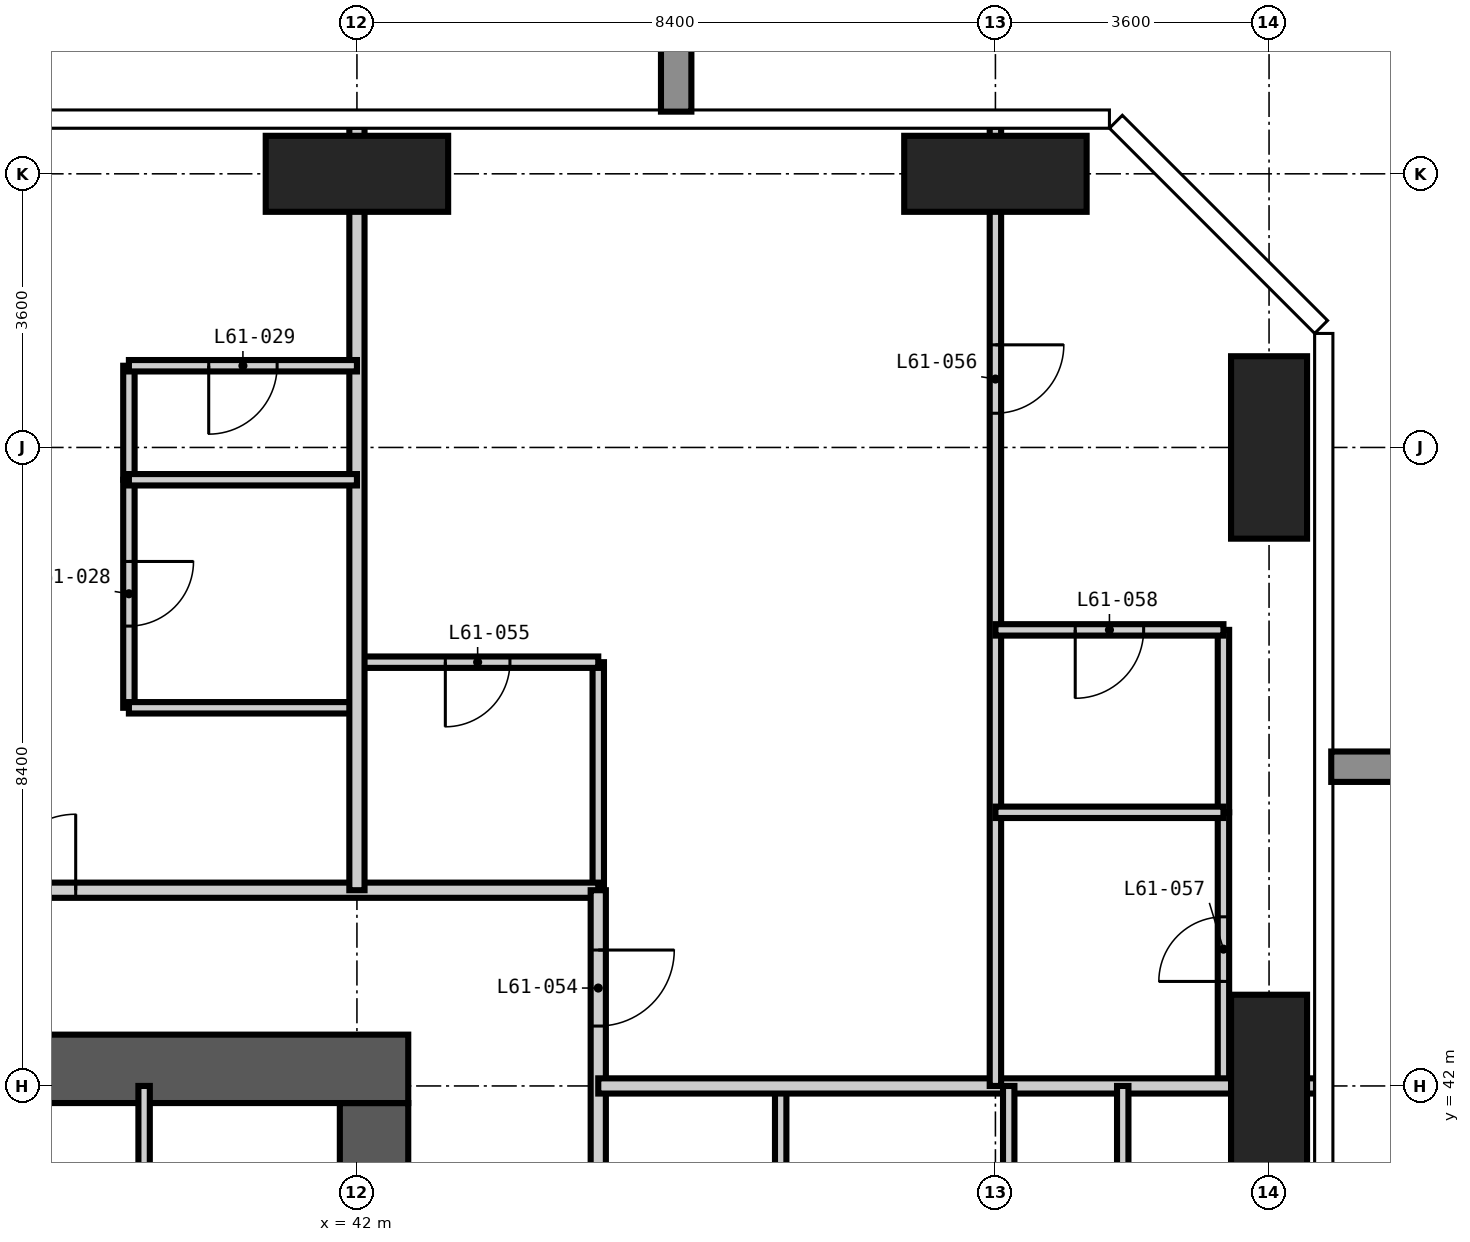
"""IFC4 building model, lengths in metres.
Left out: names, types, materials, properties, quantities, classifications, styles, units other than length and angle.
Written with IfcOpenShell. Run it as: python <this file> out.ifc"""

import sys

from ifc_helpers import new_model, si_unit, direction, frame, frame_2d, origin, origin_2d, place, context, subcontext, project, spatial, rectangle, extrude, element, fill, save


model = new_model("IFC4")
c1 = context("Model", 3, precision=1e-05, world=origin(), true_north=direction((0.0, 1.0)))
c2 = subcontext(c1, "Body", "Model", "MODEL_VIEW")
j1 = project(units=[si_unit("LENGTHUNIT", "METRE"), si_unit("PLANEANGLEUNIT", "RADIAN")], contexts=[c1])
p1 = place(None, origin())
s1 = spatial("IfcSite", under=j1, at=p1, CompositionType="ELEMENT")
p2 = place(p1, origin())
s2 = spatial("IfcBuilding", under=s1, at=p2, CompositionType="ELEMENT")
p3 = place(p2, frame((0.0, 0.0, 237.3)))
s3 = spatial("IfcBuildingStorey", under=s2, at=p3, CompositionType="ELEMENT", Elevation=237.3)
for number, where, z_axis, x_axis in (
    (1, (42.0, 54.0, -0.35), (0.0, 0.0, 1.0), (1.0, 0.0, 0.0)),
    (2, (50.4, 54.0, -0.35), (0.0, 0.0, 1.0), (1.0, 0.0, 0.0)),
):
    element("IfcColumn", number, at=place(p3, frame(where, z_axis=z_axis, x_axis=x_axis)), inside=s3, PredefinedType="COLUMN", context=c2, shape_type="SweptSolid", body=[
        extrude(rectangle(XDim=2.4, YDim=1.0, at=origin_2d()), origin(), (0.0, 0.0, 1.0), 3.9),
    ])
for number, where, z_axis, x_axis in (
    (3, (54.0, 42.0, -0.35), (0.0, 0.0, 1.0), (1.0, 0.0, 0.0)),
    (4, (54.0, 50.4, -0.35), (0.0, 0.0, 1.0), (1.0, 0.0, 0.0)),
):
    element("IfcColumn", number, at=place(p3, frame(where, z_axis=z_axis, x_axis=x_axis)), inside=s3, PredefinedType="COLUMN", context=c2, shape_type="SweptSolid", body=[
        extrude(rectangle(XDim=1.0, YDim=2.4, at=origin_2d()), origin(), (0.0, 0.0, 1.0), 3.9),
    ])
p4 = place(p3, frame((42.225, 17.025, -0.35), z_axis=(0.0, 0.0, 1.0), x_axis=(0.0, 1.0, 0.0)))
e5 = element("IfcWall", 5, at=p4, inside=s3, PredefinedType="SHEAR", context=c2, shape_type="SweptSolid", body=[
    extrude(rectangle(XDim=24.75, YDim=0.9, at=frame_2d((12.375, 0.0))), origin(), (0.0, 0.0, 1.0), 3.9),
])
p5 = place(p4, frame((0.575, 0.0, 0.35)))
e6 = element("IfcOpeningElement", 6, at=p5, cuts=e5, PredefinedType="OPENING", context=c2, shape_type="SweptSolid", body=[
    extrude(rectangle(XDim=1.2, YDim=2.2, at=frame_2d((0.6, 1.1))), frame((0.0, 0.46, 0.0), z_axis=(0.0, -1.0, 0.0), x_axis=(1.0, 0.0, 0.0)), (0.0, 0.0, 1.0), 0.92),
])
p6 = place(p4, frame((11.475, 0.0, 0.35)))
e7 = element("IfcOpeningElement", 7, at=p6, cuts=e5, PredefinedType="OPENING", context=c2, shape_type="SweptSolid", body=[
    extrude(rectangle(XDim=1.8, YDim=2.2, at=frame_2d((0.9, 1.1))), frame((0.0, 0.46, 0.0), z_axis=(0.0, -1.0, 0.0), x_axis=(1.0, 0.0, 0.0)), (0.0, 0.0, 1.0), 0.92),
])
p7 = place(p4, frame((20.275, 0.0, 0.35)))
e8 = element("IfcOpeningElement", 8, at=p7, cuts=e5, PredefinedType="OPENING", context=c2, shape_type="SweptSolid", body=[
    extrude(rectangle(XDim=1.0, YDim=2.1, at=frame_2d((0.5, 1.05))), frame((0.0, 0.46, 0.0), z_axis=(0.0, -1.0, 0.0), x_axis=(1.0, 0.0, 0.0)), (0.0, 0.0, 1.0), 0.92),
])
p8 = place(p3, frame((42.675, 42.225, -0.35), z_axis=(0.0, 0.0, 1.0), x_axis=(-1.0, 0.0, 0.0)))
e9 = element("IfcWall", 9, at=p8, inside=s3, PredefinedType="SHEAR", context=c2, shape_type="SweptSolid", body=[
    extrude(rectangle(XDim=18.15, YDim=0.9, at=frame_2d((9.075, 0.0))), origin(), (0.0, 0.0, 1.0), 3.9),
])
p9 = place(p8, frame((10.575, 0.0, 0.35)))
e10 = element("IfcOpeningElement", 10, at=p9, cuts=e9, PredefinedType="OPENING", context=c2, shape_type="SweptSolid", body=[
    extrude(rectangle(XDim=1.2, YDim=2.2, at=frame_2d((0.6, 1.1))), frame((0.0, 0.46, 0.0), z_axis=(0.0, -1.0, 0.0), x_axis=(1.0, 0.0, 0.0)), (0.0, 0.0, 1.0), 0.92),
])
p10 = place(p3, frame((39.0, 46.975, 0.0), z_axis=(0.0, 0.0, 1.0), x_axis=(0.0, 1.0, 0.0)))
e11 = element("IfcWall", 11, at=p10, inside=s3, PredefinedType="PARTITIONING", context=c2, shape_type="SweptSolid", body=[
    extrude(rectangle(XDim=3.0, YDim=0.15, at=frame_2d((1.5, 0.0))), origin(), (0.0, 0.0, 1.0), 3.55),
])
p11 = place(p10, frame((1.075, 0.0, 0.0)))
e12 = element("IfcOpeningElement", 12, at=p11, cuts=e11, PredefinedType="OPENING", context=c2, shape_type="SweptSolid", body=[
    extrude(rectangle(XDim=0.85, YDim=2.1, at=frame_2d((0.425, 1.05))), frame((0.0, 0.085, 0.0), z_axis=(0.0, -1.0, 0.0), x_axis=(1.0, 0.0, 0.0)), (0.0, 0.0, 1.0), 0.17),
])
p12 = place(p3, frame((45.175, 44.575, 0.0), z_axis=(0.0, 0.0, 1.0), x_axis=(0.0, 1.0, 0.0)))
e13 = element("IfcWall", 13, at=p12, inside=s3, PredefinedType="PARTITIONING", context=c2, shape_type="SweptSolid", body=[
    extrude(rectangle(XDim=3.0, YDim=0.15, at=frame_2d((1.5, 0.0))), origin(), (0.0, 0.0, 1.0), 3.55),
])
p13 = place(p3, frame((47.575, 39.0, 0.0), z_axis=(0.0, 0.0, 1.0), x_axis=(0.0, 1.0, 0.0)))
e14 = element("IfcWall", 14, at=p13, inside=s3, PredefinedType="PARTITIONING", context=c2, shape_type="SweptSolid", body=[
    extrude(rectangle(XDim=3.0, YDim=0.15, at=frame_2d((1.5, 0.0))), origin(), (0.0, 0.0, 1.0), 3.55),
])
p14 = place(p13, frame((1.075, 0.0, 0.0)))
e15 = element("IfcOpeningElement", 15, at=p14, cuts=e14, PredefinedType="OPENING", context=c2, shape_type="SweptSolid", body=[
    extrude(rectangle(XDim=0.85, YDim=2.1, at=frame_2d((0.425, 1.05))), frame((0.0, 0.085, 0.0), z_axis=(0.0, -1.0, 0.0), x_axis=(1.0, 0.0, 0.0)), (0.0, 0.0, 1.0), 0.17),
])
p15 = place(p3, frame((53.4, 42.0, 0.0), z_axis=(0.0, 0.0, 1.0), x_axis=(0.0, 1.0, 0.0)))
e16 = element("IfcWall", 16, at=p15, inside=s3, PredefinedType="PARTITIONING", context=c2, shape_type="SweptSolid", body=[
    extrude(rectangle(XDim=3.6, YDim=0.15, at=frame_2d((1.8, 0.0))), origin(), (0.0, 0.0, 1.0), 3.55),
])
p16 = place(p15, frame((1.375, 0.0, 0.0)))
e17 = element("IfcOpeningElement", 17, at=p16, cuts=e16, PredefinedType="OPENING", context=c2, shape_type="SweptSolid", body=[
    extrude(rectangle(XDim=0.85, YDim=2.1, at=frame_2d((0.425, 1.05))), frame((0.0, 0.085, 0.0), z_axis=(0.0, -1.0, 0.0), x_axis=(1.0, 0.0, 0.0)), (0.0, 0.0, 1.0), 0.17),
])
p17 = place(p3, frame((39.0, 46.975, 0.0), z_axis=(0.0, 0.0, 1.0), x_axis=(1.0, 0.0, 0.0)))
e18 = element("IfcWall", 18, at=p17, inside=s3, PredefinedType="PARTITIONING", context=c2, shape_type="SweptSolid", body=[
    extrude(rectangle(XDim=3.0, YDim=0.15, at=frame_2d((1.5, 0.0))), origin(), (0.0, 0.0, 1.0), 3.55),
])
p18 = place(p3, frame((42.0, 47.575, 0.0), z_axis=(0.0, 0.0, 1.0), x_axis=(1.0, 0.0, 0.0)))
e19 = element("IfcWall", 19, at=p18, inside=s3, PredefinedType="PARTITIONING", context=c2, shape_type="SweptSolid", body=[
    extrude(rectangle(XDim=3.175, YDim=0.15, at=frame_2d((1.587, 0.0))), origin(), (0.0, 0.0, 1.0), 3.55),
])
p19 = place(p18, frame((1.163, 0.0, 0.0)))
e20 = element("IfcOpeningElement", 20, at=p19, cuts=e19, PredefinedType="OPENING", context=c2, shape_type="SweptSolid", body=[
    extrude(rectangle(XDim=0.85, YDim=2.1, at=frame_2d((0.425, 1.05))), frame((0.0, 0.085, 0.0), z_axis=(0.0, -1.0, 0.0), x_axis=(1.0, 0.0, 0.0)), (0.0, 0.0, 1.0), 0.17),
])
p20 = place(p3, frame((22.325, 44.575, 0.0), z_axis=(0.0, 0.0, 1.0), x_axis=(1.0, 0.0, 0.0)))
e21 = element("IfcWall", 21, at=p20, inside=s3, PredefinedType="PARTITIONING", context=c2, shape_type="SweptSolid", body=[
    extrude(rectangle(XDim=22.85, YDim=0.2, at=frame_2d((11.425, 0.0))), origin(), (0.0, 0.0, 1.0), 3.55),
])
p21 = place(p20, frame((6.575, 0.0, 0.0)))
e22 = element("IfcOpeningElement", 22, at=p21, cuts=e21, PredefinedType="OPENING", context=c2, shape_type="SweptSolid", body=[
    extrude(rectangle(XDim=1.0, YDim=2.2, at=frame_2d((0.5, 1.1))), frame((0.0, 0.11, 0.0), z_axis=(0.0, -1.0, 0.0), x_axis=(1.0, 0.0, 0.0)), (0.0, 0.0, 1.0), 0.22),
])
p22 = place(p20, frame((14.975, 0.0, 0.0)))
e23 = element("IfcOpeningElement", 23, at=p22, cuts=e21, PredefinedType="OPENING", context=c2, shape_type="SweptSolid", body=[
    extrude(rectangle(XDim=1.0, YDim=2.2, at=frame_2d((0.5, 1.1))), frame((0.0, 0.11, 0.0), z_axis=(0.0, -1.0, 0.0), x_axis=(1.0, 0.0, 0.0)), (0.0, 0.0, 1.0), 0.22),
])
p23 = place(p3, frame((45.175, 44.575, 0.0), z_axis=(0.0, 0.0, 1.0), x_axis=(0.0, -1.0, 0.0)))
e24 = element("IfcWall", 24, at=p23, inside=s3, PredefinedType="PARTITIONING", context=c2, shape_type="SweptSolid", body=[
    extrude(rectangle(XDim=10.975, YDim=0.2, at=frame_2d((5.487, 0.0))), origin(), (0.0, 0.0, 1.0), 3.55),
])
p24 = place(p23, frame((7.475, 0.0, 0.0)))
e25 = element("IfcOpeningElement", 25, at=p24, cuts=e24, PredefinedType="OPENING", context=c2, shape_type="SweptSolid", body=[
    extrude(rectangle(XDim=1.0, YDim=2.2, at=frame_2d((0.5, 1.1))), frame((0.0, 0.11, 0.0), z_axis=(0.0, -1.0, 0.0), x_axis=(1.0, 0.0, 0.0)), (0.0, 0.0, 1.0), 0.22),
])
p25 = place(p23, frame((0.787, 0.0, 0.0)))
e26 = element("IfcOpeningElement", 26, at=p25, cuts=e24, PredefinedType="OPENING", context=c2, shape_type="SweptSolid", body=[
    extrude(rectangle(XDim=1.0, YDim=2.2, at=frame_2d((0.5, 1.1))), frame((0.0, 0.11, 0.0), z_axis=(0.0, -1.0, 0.0), x_axis=(1.0, 0.0, 0.0)), (0.0, 0.0, 1.0), 0.22),
])
p26 = place(p3, frame((42.0, 44.575, 0.0), z_axis=(0.0, 0.0, 1.0), x_axis=(0.0, 1.0, 0.0)))
e27 = element("IfcWall", 27, at=p26, inside=s3, PredefinedType="PARTITIONING", context=c2, shape_type="SweptSolid", body=[
    extrude(rectangle(XDim=10.043, YDim=0.2, at=frame_2d((5.021, 0.0))), origin(), (0.0, 0.0, 1.0), 3.55),
])
p27 = place(p3, frame((45.175, 42.0, 0.0), z_axis=(0.0, 0.0, 1.0), x_axis=(1.0, 0.0, 0.0)))
e28 = element("IfcWall", 28, at=p27, inside=s3, PredefinedType="PARTITIONING", context=c2, shape_type="SweptSolid", body=[
    extrude(rectangle(XDim=9.443, YDim=0.2, at=frame_2d((4.721, 0.0))), origin(), (0.0, 0.0, 1.0), 3.55),
])
p28 = place(p3, frame((39.0, 49.975, 0.0), z_axis=(0.0, 0.0, 1.0), x_axis=(0.0, 1.0, 0.0)))
e29 = element("IfcWall", 29, at=p28, inside=s3, PredefinedType="PARTITIONING", context=c2, shape_type="SweptSolid", body=[
    extrude(rectangle(XDim=1.5, YDim=0.15, at=frame_2d((0.75, 0.0))), origin(), (0.0, 0.0, 1.0), 3.55),
])
p29 = place(p3, frame((39.2, 33.6, 0.0), z_axis=(0.0, 0.0, 1.0), x_axis=(0.0, 1.0, 0.0)))
e30 = element("IfcWall", 30, at=p29, inside=s3, PredefinedType="PARTITIONING", context=c2, shape_type="SweptSolid", body=[
    extrude(rectangle(XDim=8.4, YDim=0.15, at=frame_2d((4.2, 0.0))), origin(), (0.0, 0.0, 1.0), 3.55),
])
p30 = place(p29, frame((3.7, 0.0, 0.0)))
e31 = element("IfcOpeningElement", 31, at=p30, cuts=e30, PredefinedType="OPENING", context=c2, shape_type="SweptSolid", body=[
    extrude(rectangle(XDim=1.0, YDim=2.1, at=frame_2d((0.5, 1.05))), frame((0.0, 0.085, 0.0), z_axis=(0.0, -1.0, 0.0), x_axis=(1.0, 0.0, 0.0)), (0.0, 0.0, 1.0), 0.17),
])
p31 = place(p3, frame((50.4, 42.0, 0.0), z_axis=(0.0, 0.0, 1.0), x_axis=(0.0, 1.0, 0.0)))
e32 = element("IfcWall", 32, at=p31, inside=s3, PredefinedType="PARTITIONING", context=c2, shape_type="SweptSolid", body=[
    extrude(rectangle(XDim=12.618, YDim=0.15, at=frame_2d((6.309, 0.0))), origin(), (0.0, 0.0, 1.0), 3.55),
])
p32 = place(p31, frame((8.85, 0.0, 0.0)))
e33 = element("IfcOpeningElement", 33, at=p32, cuts=e32, PredefinedType="OPENING", context=c2, shape_type="SweptSolid", body=[
    extrude(rectangle(XDim=0.9, YDim=2.1, at=frame_2d((0.45, 1.05))), frame((0.0, 0.085, 0.0), z_axis=(0.0, -1.0, 0.0), x_axis=(1.0, 0.0, 0.0)), (0.0, 0.0, 1.0), 0.17),
])
p33 = place(p3, frame((50.575, 39.0, 0.0), z_axis=(0.0, 0.0, 1.0), x_axis=(0.0, 1.0, 0.0)))
e34 = element("IfcWall", 34, at=p33, inside=s3, PredefinedType="PARTITIONING", context=c2, shape_type="SweptSolid", body=[
    extrude(rectangle(XDim=3.0, YDim=0.15, at=frame_2d((1.5, 0.0))), origin(), (0.0, 0.0, 1.0), 3.55),
])
p34 = place(p3, frame((52.075, 39.0, 0.0), z_axis=(0.0, 0.0, 1.0), x_axis=(0.0, 1.0, 0.0)))
e35 = element("IfcWall", 35, at=p34, inside=s3, PredefinedType="PARTITIONING", context=c2, shape_type="SweptSolid", body=[
    extrude(rectangle(XDim=3.0, YDim=0.15, at=frame_2d((1.5, 0.0))), origin(), (0.0, 0.0, 1.0), 3.55),
])
p35 = place(p34, frame((0.85, 0.0, 0.0)))
e36 = element("IfcOpeningElement", 36, at=p35, cuts=e35, PredefinedType="OPENING", context=c2, shape_type="SweptSolid", body=[
    extrude(rectangle(XDim=0.9, YDim=2.1, at=frame_2d((0.45, 1.05))), frame((0.0, 0.085, 0.0), z_axis=(0.0, -1.0, 0.0), x_axis=(1.0, 0.0, 0.0)), (0.0, 0.0, 1.0), 0.17),
])
p36 = place(p3, frame((53.4, 45.6, 0.0), z_axis=(0.0, 0.0, 1.0), x_axis=(0.0, 1.0, 0.0)))
e37 = element("IfcWall", 37, at=p36, inside=s3, PredefinedType="PARTITIONING", context=c2, shape_type="SweptSolid", body=[
    extrude(rectangle(XDim=2.4, YDim=0.15, at=frame_2d((1.2, 0.0))), origin(), (0.0, 0.0, 1.0), 3.55),
])
p37 = place(p3, frame((50.4, 45.6, 0.0), z_axis=(0.0, 0.0, 1.0), x_axis=(1.0, 0.0, 0.0)))
e38 = element("IfcWall", 38, at=p37, inside=s3, PredefinedType="PARTITIONING", context=c2, shape_type="SweptSolid", body=[
    extrude(rectangle(XDim=3.0, YDim=0.15, at=frame_2d((1.5, 0.0))), origin(), (0.0, 0.0, 1.0), 3.55),
])
p38 = place(p3, frame((50.4, 48.0, 0.0), z_axis=(0.0, 0.0, 1.0), x_axis=(1.0, 0.0, 0.0)))
e39 = element("IfcWall", 39, at=p38, inside=s3, PredefinedType="PARTITIONING", context=c2, shape_type="SweptSolid", body=[
    extrude(rectangle(XDim=3.0, YDim=0.15, at=frame_2d((1.5, 0.0))), origin(), (0.0, 0.0, 1.0), 3.55),
])
p39 = place(p38, frame((1.05, 0.0, 0.0)))
e40 = element("IfcOpeningElement", 40, at=p39, cuts=e39, PredefinedType="OPENING", context=c2, shape_type="SweptSolid", body=[
    extrude(rectangle(XDim=0.9, YDim=2.1, at=frame_2d((0.45, 1.05))), frame((0.0, 0.085, 0.0), z_axis=(0.0, -1.0, 0.0), x_axis=(1.0, 0.0, 0.0)), (0.0, 0.0, 1.0), 0.17),
])
p40 = place(p3, frame((39.0, 49.975, 0.0), z_axis=(0.0, 0.0, 1.0), x_axis=(1.0, 0.0, 0.0)))
e41 = element("IfcWall", 41, at=p40, inside=s3, PredefinedType="PARTITIONING", context=c2, shape_type="SweptSolid", body=[
    extrude(rectangle(XDim=3.0, YDim=0.15, at=frame_2d((1.5, 0.0))), origin(), (0.0, 0.0, 1.0), 3.55),
])
p41 = place(p3, frame((39.0, 51.475, 0.0), z_axis=(0.0, 0.0, 1.0), x_axis=(1.0, 0.0, 0.0)))
e42 = element("IfcWall", 42, at=p41, inside=s3, PredefinedType="PARTITIONING", context=c2, shape_type="SweptSolid", body=[
    extrude(rectangle(XDim=3.0, YDim=0.15, at=frame_2d((1.5, 0.0))), origin(), (0.0, 0.0, 1.0), 3.55),
])
p42 = place(p41, frame((1.05, 0.0, 0.0)))
e43 = element("IfcOpeningElement", 43, at=p42, cuts=e42, PredefinedType="OPENING", context=c2, shape_type="SweptSolid", body=[
    extrude(rectangle(XDim=0.9, YDim=2.1, at=frame_2d((0.45, 1.05))), frame((0.0, 0.085, 0.0), z_axis=(0.0, -1.0, 0.0), x_axis=(1.0, 0.0, 0.0)), (0.0, 0.0, 1.0), 0.17),
])
p43 = place(p22, origin())
e44 = element("IfcDoor", 44, at=p43, inside=s3, OperationType="SINGLE_SWING_RIGHT", PredefinedType="DOOR", context=c2, shape_type="SweptSolid", body=[
    extrude(rectangle(XDim=1.0, YDim=2.2, at=frame_2d((0.5, 1.1))), frame((0.0, 0.025, 0.0), z_axis=(0.0, -1.0, 0.0), x_axis=(1.0, 0.0, 0.0)), (0.0, 0.0, 1.0), 0.05),
])
fill(e23, e44)
p44 = place(p11, frame((0.85, 0.0, 0.0), z_axis=(0.0, 0.0, 1.0), x_axis=(-1.0, 0.0, 0.0)))
e45 = element("IfcDoor", 45, at=p44, inside=s3, OperationType="SINGLE_SWING_LEFT", PredefinedType="DOOR", context=c2, shape_type="SweptSolid", body=[
    extrude(rectangle(XDim=0.85, YDim=2.1, at=frame_2d((0.425, 1.05))), frame((0.0, 0.025, 0.0), z_axis=(0.0, -1.0, 0.0), x_axis=(1.0, 0.0, 0.0)), (0.0, 0.0, 1.0), 0.05),
])
fill(e12, e45)
p45 = place(p42, frame((0.9, 0.0, 0.0), z_axis=(0.0, 0.0, 1.0), x_axis=(-1.0, 0.0, 0.0)))
e46 = element("IfcDoor", 46, at=p45, inside=s3, OperationType="SINGLE_SWING_RIGHT", PredefinedType="DOOR", context=c2, shape_type="SweptSolid", body=[
    extrude(rectangle(XDim=0.9, YDim=2.1, at=frame_2d((0.45, 1.05))), frame((0.0, 0.025, 0.0), z_axis=(0.0, -1.0, 0.0), x_axis=(1.0, 0.0, 0.0)), (0.0, 0.0, 1.0), 0.05),
])
fill(e43, e46)
p46 = place(p25, origin())
e47 = element("IfcDoor", 47, at=p46, inside=s3, OperationType="SINGLE_SWING_LEFT", PredefinedType="DOOR", context=c2, shape_type="SweptSolid", body=[
    extrude(rectangle(XDim=1.0, YDim=2.2, at=frame_2d((0.5, 1.1))), frame((0.0, 0.025, 0.0), z_axis=(0.0, -1.0, 0.0), x_axis=(1.0, 0.0, 0.0)), (0.0, 0.0, 1.0), 0.05),
])
fill(e26, e47)
p47 = place(p19, frame((0.85, 0.0, 0.0), z_axis=(0.0, 0.0, 1.0), x_axis=(-1.0, 0.0, 0.0)))
e48 = element("IfcDoor", 48, at=p47, inside=s3, OperationType="SINGLE_SWING_RIGHT", PredefinedType="DOOR", context=c2, shape_type="SweptSolid", body=[
    extrude(rectangle(XDim=0.85, YDim=2.1, at=frame_2d((0.425, 1.05))), frame((0.0, 0.025, 0.0), z_axis=(0.0, -1.0, 0.0), x_axis=(1.0, 0.0, 0.0)), (0.0, 0.0, 1.0), 0.05),
])
fill(e20, e48)
p48 = place(p32, frame((0.9, 0.0, 0.0), z_axis=(0.0, 0.0, 1.0), x_axis=(-1.0, 0.0, 0.0)))
e49 = element("IfcDoor", 49, at=p48, inside=s3, OperationType="SINGLE_SWING_LEFT", PredefinedType="DOOR", context=c2, shape_type="SweptSolid", body=[
    extrude(rectangle(XDim=0.9, YDim=2.1, at=frame_2d((0.45, 1.05))), frame((0.0, 0.025, 0.0), z_axis=(0.0, -1.0, 0.0), x_axis=(1.0, 0.0, 0.0)), (0.0, 0.0, 1.0), 0.05),
])
fill(e33, e49)
p49 = place(p16, origin())
e50 = element("IfcDoor", 50, at=p49, inside=s3, OperationType="SINGLE_SWING_LEFT", PredefinedType="DOOR", context=c2, shape_type="SweptSolid", body=[
    extrude(rectangle(XDim=0.85, YDim=2.1, at=frame_2d((0.425, 1.05))), frame((0.0, 0.025, 0.0), z_axis=(0.0, -1.0, 0.0), x_axis=(1.0, 0.0, 0.0)), (0.0, 0.0, 1.0), 0.05),
])
fill(e17, e50)
p50 = place(p39, frame((0.9, 0.0, 0.0), z_axis=(0.0, 0.0, 1.0), x_axis=(-1.0, 0.0, 0.0)))
e51 = element("IfcDoor", 51, at=p50, inside=s3, OperationType="SINGLE_SWING_RIGHT", PredefinedType="DOOR", context=c2, shape_type="SweptSolid", body=[
    extrude(rectangle(XDim=0.9, YDim=2.1, at=frame_2d((0.45, 1.05))), frame((0.0, 0.025, 0.0), z_axis=(0.0, -1.0, 0.0), x_axis=(1.0, 0.0, 0.0)), (0.0, 0.0, 1.0), 0.05),
])
fill(e40, e51)
save(model, sys.argv[1])
